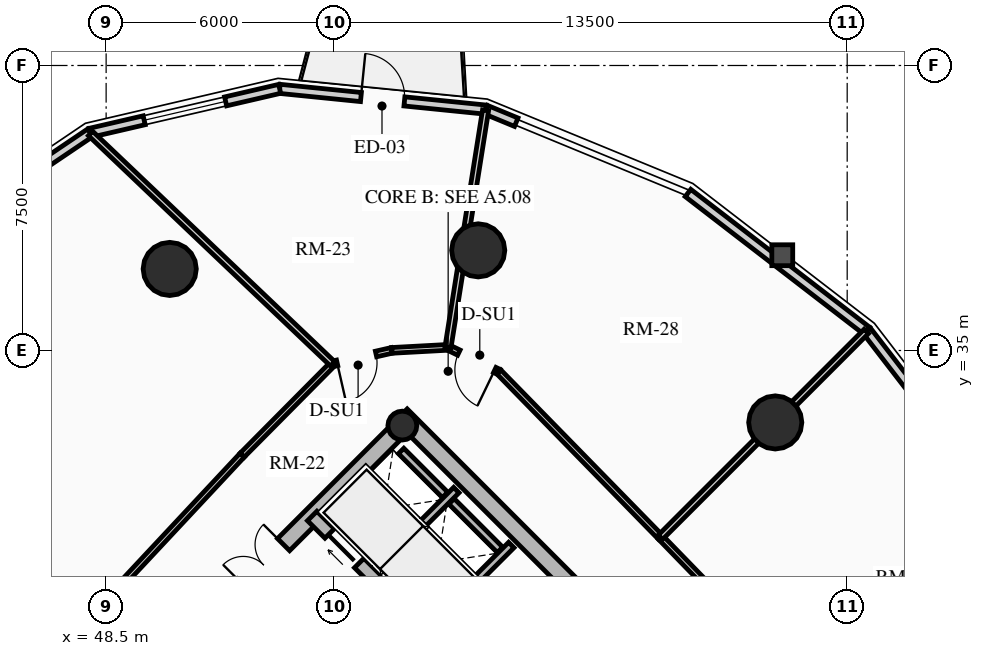
"""IFC4 building model, lengths in metres.
Left out: names, types, materials, properties, quantities, classifications, styles, units other than length and angle.
Written with IfcOpenShell. Run it as: python <this file> out.ifc"""

import sys

from ifc_helpers import new_model, si_unit, direction, frame, frame_2d, origin, origin_2d, place, context, subcontext, project, spatial, rectangle, circle, hollow_circle, extrude, source, transform, mapped, element, fill, save


model = new_model("IFC4")
c1 = context("Model", 3, precision=1e-05, world=origin(), true_north=direction((0.0, 1.0)))
c2 = subcontext(c1, "Body", "Model", "MODEL_VIEW")
j1 = project(units=[si_unit("LENGTHUNIT", "METRE"), si_unit("PLANEANGLEUNIT", "RADIAN")], contexts=[c1])
p1 = place(None, origin())
s1 = spatial("IfcSite", under=j1, at=p1, CompositionType="ELEMENT")
p2 = place(p1, origin())
s2 = spatial("IfcBuilding", under=s1, at=p2, CompositionType="ELEMENT")
p3 = place(p2, frame((0.0, 0.0, 122.53)))
s3 = spatial("IfcBuildingStorey", under=s2, at=p3, CompositionType="ELEMENT", Elevation=122.53)
p4 = place(p3, frame((66.303, 23.263, 0.0), z_axis=(0.0, 0.0, 1.0), x_axis=(-0.707106781187, 0.707106781187, 0.0)))
e1 = element("IfcWall", 1, at=p4, inside=s3, PredefinedType="SHEAR", context=c2, shape_type="SweptSolid", body=[
    extrude(rectangle(XDim=14.2, YDim=0.45, at=frame_2d((7.1, 0.0))), origin(), (0.0, 0.0, 1.0), 2.91),
])
p5 = place(p3, frame((48.856, 25.578, 0.0), z_axis=(0.0, 0.0, 1.0), x_axis=(0.707106781187, 0.707106781187, 0.0)))
e2 = element("IfcWall", 2, at=p5, inside=s3, PredefinedType="SHEAR", context=c2, shape_type="SweptSolid", body=[
    extrude(rectangle(XDim=10.7, YDim=0.45, at=frame_2d((5.35, 0.0))), origin(), (0.0, 0.0, 1.0), 2.91),
])
m1 = source(origin(), c2, "Body", "SweptSolid", [
    extrude(rectangle(XDim=1.5, YDim=2.02, at=frame_2d((0.75, 1.01))), frame((0.0, 0.235, 0.0), z_axis=(0.0, -1.0, 0.0), x_axis=(1.0, 0.0, 0.0)), (0.0, 0.0, 1.0), 0.47),
])
p6 = place(p5, frame((4.6, 0.0, 0.0)))
e3 = element("IfcOpeningElement", 3, at=p6, cuts=e2, PredefinedType="OPENING", context=c2, shape_type="MappedRepresentation", body=[
    mapped(m1, transform((0.0, 0.0, 0.0), x_axis=(1.0, 0.0, 0.0), y_axis=(0.0, 1.0, 0.0), z_axis=(0.0, 0.0, 1.0), scale=1.0)),
])
p7 = place(p3, frame((63.645, 20.922, 0.0), z_axis=(0.0, 0.0, 1.0), x_axis=(-0.707106781187, 0.707106781187, 0.0)))
e4 = element("IfcWall", 4, at=p7, inside=s3, PredefinedType="SHEAR", context=c2, shape_type="SweptSolid", body=[
    extrude(rectangle(XDim=13.75, YDim=0.35, at=frame_2d((6.875, 0.0))), origin(), (0.0, 0.0, 1.0), 2.91),
])
m2 = source(origin(), c2, "Body", "SweptSolid", [
    extrude(rectangle(XDim=1.1, YDim=2.015, at=frame_2d((0.55, 1.007))), frame((0.0, 0.185, 0.0), z_axis=(0.0, -1.0, 0.0), x_axis=(1.0, 0.0, 0.0)), (0.0, 0.0, 1.0), 0.37),
])
p8 = place(p7, frame((10.0, 0.0, 0.0)))
e5 = element("IfcOpeningElement", 5, at=p8, cuts=e4, PredefinedType="OPENING", context=c2, shape_type="MappedRepresentation", body=[
    mapped(m2, transform((0.0, 0.0, 0.0), x_axis=(1.0, 0.0, 0.0), y_axis=(0.0, 1.0, 0.0), z_axis=(0.0, 0.0, 1.0), scale=1.0)),
])
p9 = place(p7, frame((12.0, 0.0, 0.0)))
e6 = element("IfcOpeningElement", 6, at=p9, cuts=e4, PredefinedType="OPENING", context=c2, shape_type="MappedRepresentation", body=[
    mapped(m2, transform((0.0, 0.0, 0.0), x_axis=(1.0, 0.0, 0.0), y_axis=(0.0, 1.0, 0.0), z_axis=(0.0, 0.0, 1.0), scale=1.0)),
])
m3 = source(origin(), c2, "Body", "SweptSolid", [
    extrude(rectangle(XDim=1.15, YDim=2.02, at=frame_2d((0.575, 1.01))), frame((0.0, 0.185, 0.0), z_axis=(0.0, -1.0, 0.0), x_axis=(1.0, 0.0, 0.0)), (0.0, 0.0, 1.0), 0.37),
])
p10 = place(p7, frame((5.305, 0.0, 0.0)))
e7 = element("IfcOpeningElement", 7, at=p10, cuts=e4, PredefinedType="OPENING", context=c2, shape_type="MappedRepresentation", body=[
    mapped(m3, transform((0.0, 0.0, 0.0), x_axis=(1.0, 0.0, 0.0), y_axis=(0.0, 1.0, 0.0), z_axis=(0.0, 0.0, 1.0), scale=1.0)),
])
p11 = place(p3, frame((56.294, 33.024, 0.0), z_axis=(0.0, 0.0, 1.0), x_axis=(0.707106781187, 0.707106781187, 0.0)))
e8 = element("IfcColumn", 8, at=p11, inside=s3, PredefinedType="COLUMN", context=c2, shape_type="SweptSolid", body=[
    extrude(hollow_circle(Radius=0.38, WallThickness=0.032, at=origin_2d()), origin(), (0.0, 0.0, 1.0), 2.91),
])
for number, where, z_axis, x_axis in (
    (9, (66.107, 33.107, 0.0), (0.0, 0.0, 1.0), (1.0, 0.0, 0.0)),
    (10, (58.291, 37.635, 0.0), (0.0, 0.0, 1.0), (1.0, 0.0, 0.0)),
    (11, (50.173, 37.146, 0.0), (0.0, 0.0, 1.0), (1.0, 0.0, 0.0)),
):
    element("IfcColumn", number, at=place(p3, frame(where, z_axis=z_axis, x_axis=x_axis)), inside=s3, PredefinedType="USERDEFINED", context=c2, shape_type="SweptSolid", body=[
        extrude(circle(Radius=0.7, at=origin_2d()), origin(), (0.0, 0.0, 1.0), 2.91),
    ])
p12 = place(p3, frame((63.811, 39.145, 0.0), z_axis=(0.0, 0.0, 1.0), x_axis=(0.791982052206, -0.61054437102, 0.0)))
e12 = element("IfcWall", 12, at=p12, inside=s3, PredefinedType="SOLIDWALL", context=c2, shape_type="SweptSolid", body=[
    extrude(rectangle(XDim=5.942, YDim=0.24, at=frame_2d((2.971, 0.0))), origin(), (0.0, 0.0, 1.0), 2.139),
])
p13 = place(p3, frame((58.487, 41.339, 0.0), z_axis=(0.0, 0.0, 1.0), x_axis=(0.924556017656, -0.381046152345, 0.0)))
e13 = element("IfcWall", 13, at=p13, inside=s3, PredefinedType="SOLIDWALL", context=c2, shape_type="SweptSolid", body=[
    extrude(rectangle(XDim=0.87, YDim=0.24, at=frame_2d((0.435, 0.0))), origin(), (0.0, 0.0, 1.0), 2.139),
])
p14 = place(p3, frame((53.067, 41.885, 0.0), z_axis=(0.0, 0.0, 1.0), x_axis=(0.994971754311, -0.10015591906, 0.0)))
e14 = element("IfcWall", 14, at=p14, inside=s3, PredefinedType="SOLIDWALL", context=c2, shape_type="SweptSolid", body=[
    extrude(rectangle(XDim=5.448, YDim=0.24, at=frame_2d((2.724, 0.0))), origin(), (0.0, 0.0, 1.0), 2.139),
])
m4 = source(origin(), c2, "Body", "SweptSolid", [
    extrude(rectangle(XDim=1.15, YDim=2.005, at=frame_2d((0.575, 1.002))), frame((0.0, 0.13, 0.0), z_axis=(0.0, -1.0, 0.0), x_axis=(1.0, 0.0, 0.0)), (0.0, 0.0, 1.0), 0.26),
])
p15 = place(p14, frame((2.149, 0.0, 0.0)))
e15 = element("IfcOpeningElement", 15, at=p15, cuts=e14, PredefinedType="OPENING", context=c2, shape_type="MappedRepresentation", body=[
    mapped(m4, transform((0.0, 0.0, 0.0), x_axis=(1.0, 0.0, 0.0), y_axis=(0.0, 1.0, 0.0), z_axis=(0.0, 0.0, 1.0), scale=1.0)),
])
p16 = place(p3, frame((48.08, 40.729, 0.0), z_axis=(0.0, 0.0, 1.0), x_axis=(0.974165631126, 0.225834725257, 0.0)))
e16 = element("IfcWall", 16, at=p16, inside=s3, PredefinedType="SOLIDWALL", context=c2, shape_type="SweptSolid", body=[
    extrude(rectangle(XDim=5.119, YDim=0.24, at=frame_2d((2.56, 0.0))), origin(), (0.0, 0.0, 1.0), 2.139),
])
m5 = source(origin(), c2, "Body", "SweptSolid", [
    extrude(rectangle(XDim=2.2, YDim=1.35, at=frame_2d((1.1, 0.675))), frame((0.0, 0.13, 0.0), z_axis=(0.0, -1.0, 0.0), x_axis=(1.0, 0.0, 0.0)), (0.0, 0.0, 1.0), 0.26),
])
p17 = place(p16, frame((1.459, 0.0, 0.65)))
e17 = element("IfcOpeningElement", 17, at=p17, cuts=e16, PredefinedType="OPENING", context=c2, shape_type="MappedRepresentation", body=[
    mapped(m5, transform((0.0, 0.0, 0.0), x_axis=(1.0, 0.0, 0.0), y_axis=(0.0, 1.0, 0.0), z_axis=(0.0, 0.0, 1.0), scale=1.0)),
])
p18 = place(p3, frame((44.015, 37.985, 0.0), z_axis=(0.0, 0.0, 1.0), x_axis=(0.828781148131, 0.559572880421, 0.0)))
e18 = element("IfcWall", 18, at=p18, inside=s3, PredefinedType="SOLIDWALL", context=c2, shape_type="SweptSolid", body=[
    extrude(rectangle(XDim=4.905, YDim=0.24, at=frame_2d((2.452, 0.0))), origin(), (0.0, 0.0, 1.0), 2.139),
])
p19 = place(p3, frame((68.517, 35.517, 0.0), z_axis=(0.0, 0.0, 1.0), x_axis=(0.61054437102, -0.791982052206, 0.0)))
e19 = element("IfcWall", 19, at=p19, inside=s3, PredefinedType="SOLIDWALL", context=c2, shape_type="SweptSolid", body=[
    extrude(rectangle(XDim=5.942, YDim=0.24, at=frame_2d((2.971, 0.0))), origin(), (0.0, 0.0, 1.0), 2.139),
])
m6 = source(origin(), c2, "Body", "SweptSolid", [
    extrude(rectangle(XDim=1.9, YDim=1.35, at=frame_2d((0.95, 0.675))), frame((0.0, 0.13, 0.0), z_axis=(0.0, -1.0, 0.0), x_axis=(1.0, 0.0, 0.0)), (0.0, 0.0, 1.0), 0.26),
])
p20 = place(p19, frame((2.021, 0.0, 0.65)))
e20 = element("IfcOpeningElement", 20, at=p20, cuts=e19, PredefinedType="OPENING", context=c2, shape_type="MappedRepresentation", body=[
    mapped(m6, transform((0.0, 0.0, 0.0), x_axis=(1.0, 0.0, 0.0), y_axis=(0.0, 1.0, 0.0), z_axis=(0.0, 0.0, 1.0), scale=1.0)),
])
p21 = place(p3, frame((57.062, 27.781, 0.0), z_axis=(0.0, 0.0, 1.0), x_axis=(0.707106781187, 0.707106781187, 0.0)))
e21 = element("IfcWall", 21, at=p21, inside=s3, PredefinedType="SHEAR", context=c2, shape_type="SweptSolid", body=[
    extrude(rectangle(XDim=2.97, YDim=0.2, at=frame_2d((1.485, 0.0))), origin(), (0.0, 0.0, 1.0), 2.91),
])
p22 = place(p3, frame((55.615, 29.227, 0.0), z_axis=(0.0, 0.0, 1.0), x_axis=(0.707147878904, 0.70706568108, 0.0)))
e22 = element("IfcWall", 22, at=p22, inside=s3, PredefinedType="SHEAR", context=c2, shape_type="SweptSolid", body=[
    extrude(rectangle(XDim=2.97, YDim=0.2, at=frame_2d((1.485, 0.0))), origin(), (0.0, 0.0, 1.0), 2.91),
])
p23 = place(p3, frame((58.865, 29.754, 0.0), z_axis=(0.0, 0.0, 1.0), x_axis=(-0.707174411312, 0.707039144592, 0.0)))
e23 = element("IfcWall", 23, at=p23, inside=s3, PredefinedType="SHEAR", context=c2, shape_type="SweptSolid", body=[
    extrude(rectangle(XDim=1.805, YDim=0.2, at=frame_2d((0.902, 0.0))), origin(), (0.0, 0.0, 1.0), 2.91),
])
p24 = place(p3, frame((57.419, 31.2, 0.0), z_axis=(0.0, 0.0, 1.0), x_axis=(-0.707032117043, 0.707181437447, 0.0)))
e24 = element("IfcWall", 24, at=p24, inside=s3, PredefinedType="SHEAR", context=c2, shape_type="SweptSolid", body=[
    extrude(rectangle(XDim=1.635, YDim=0.2, at=frame_2d((0.817, 0.0))), origin(), (0.0, 0.0, 1.0), 2.91),
])
p25 = place(p3, frame((63.086, 30.086, 0.0), z_axis=(0.0, 0.0, 1.0), x_axis=(-0.699032802832, 0.715089603172, 0.0)))
e25 = element("IfcWall", 25, at=p25, inside=s3, PredefinedType="PARTITIONING", context=c2, shape_type="SweptSolid", body=[
    extrude(rectangle(XDim=6.082, YDim=0.15, at=frame_2d((3.041, 0.0))), origin(), (0.0, 0.0, 1.0), 2.185),
])
p26 = place(p3, frame((58.835, 34.435, 0.0), z_axis=(0.0, 0.0, 1.0), x_axis=(-0.900352167336, 0.4351620098, 0.0)))
e26 = element("IfcWall", 26, at=p26, inside=s3, PredefinedType="PARTITIONING", context=c2, shape_type="SweptSolid", body=[
    extrude(rectangle(XDim=1.488, YDim=0.15, at=frame_2d((0.744, 0.0))), origin(), (0.0, 0.0, 1.0), 2.185),
])
m7 = source(origin(), c2, "Body", "SweptSolid", [
    extrude(rectangle(XDim=1.05, YDim=2.015, at=frame_2d((0.525, 1.007))), frame((0.0, 0.085, 0.0), z_axis=(0.0, -1.0, 0.0), x_axis=(1.0, 0.0, 0.0)), (0.0, 0.0, 1.0), 0.17),
])
p27 = place(p26, frame((0.12, 0.0, 0.0)))
e27 = element("IfcOpeningElement", 27, at=p27, cuts=e26, PredefinedType="OPENING", context=c2, shape_type="MappedRepresentation", body=[
    mapped(m7, transform((0.0, 0.0, 0.0), x_axis=(1.0, 0.0, 0.0), y_axis=(0.0, 1.0, 0.0), z_axis=(0.0, 0.0, 1.0), scale=1.0)),
])
p28 = place(p3, frame((57.495, 35.083, 0.0), z_axis=(0.0, 0.0, 1.0), x_axis=(-0.998536503254, -0.054081897798, 0.0)))
e28 = element("IfcWall", 28, at=p28, inside=s3, PredefinedType="PARTITIONING", context=c2, shape_type="SweptSolid", body=[
    extrude(rectangle(XDim=1.481, YDim=0.15, at=frame_2d((0.74, 0.0))), origin(), (0.0, 0.0, 1.0), 2.185),
])
p29 = place(p3, frame((56.017, 35.003, 0.0), z_axis=(0.0, 0.0, 1.0), x_axis=(-0.974924954781, -0.222533890777, 0.0)))
e29 = element("IfcWall", 29, at=p29, inside=s3, PredefinedType="PARTITIONING", context=c2, shape_type="SweptSolid", body=[
    extrude(rectangle(XDim=1.595, YDim=0.15, at=frame_2d((0.798, 0.0))), origin(), (0.0, 0.0, 1.0), 2.185),
])
p30 = place(p29, frame((0.425, 0.0, 0.0)))
e30 = element("IfcOpeningElement", 30, at=p30, cuts=e29, PredefinedType="OPENING", context=c2, shape_type="MappedRepresentation", body=[
    mapped(m7, transform((0.0, 0.0, 0.0), x_axis=(1.0, 0.0, 0.0), y_axis=(0.0, 1.0, 0.0), z_axis=(0.0, 0.0, 1.0), scale=1.0)),
])
p31 = place(p3, frame((54.461, 34.648, 0.0), z_axis=(0.0, 0.0, 1.0), x_axis=(-0.70403409755, -0.710166170334, 0.0)))
e31 = element("IfcWall", 31, at=p31, inside=s3, PredefinedType="PARTITIONING", context=c2, shape_type="SweptSolid", body=[
    extrude(rectangle(XDim=3.384, YDim=0.15, at=frame_2d((1.692, 0.0))), origin(), (0.0, 0.0, 1.0), 2.185),
])
p32 = place(p3, frame((52.079, 32.244, 0.0), z_axis=(0.0, 0.0, 1.0), x_axis=(-0.682703325574, -0.730695674854, 0.0)))
e32 = element("IfcWall", 32, at=p32, inside=s3, PredefinedType="PARTITIONING", context=c2, shape_type="SweptSolid", body=[
    extrude(rectangle(XDim=6.527, YDim=0.15, at=frame_2d((3.263, 0.0))), origin(), (0.0, 0.0, 1.0), 2.185),
])
p33 = place(p3, frame((67.247, 25.802, 0.0), z_axis=(0.0, 0.0, 1.0), x_axis=(-0.696771261687, 0.71729339108, 0.0)))
e33 = element("IfcWall", 33, at=p33, inside=s3, PredefinedType="PARTITIONING", context=c2, shape_type="SweptSolid", body=[
    extrude(rectangle(XDim=5.972, YDim=0.15, at=frame_2d((2.986, 0.0))), origin(), (0.0, 0.0, 1.0), 2.615),
])
m8 = source(origin(), c2, "Body", "SweptSolid", [
    extrude(rectangle(XDim=1.0, YDim=2.015, at=frame_2d((0.5, 1.007))), frame((0.0, 0.085, 0.0), z_axis=(0.0, -1.0, 0.0), x_axis=(1.0, 0.0, 0.0)), (0.0, 0.0, 1.0), 0.17),
])
p34 = place(p33, frame((2.486, 0.0, 0.0)))
e34 = element("IfcOpeningElement", 34, at=p34, cuts=e33, PredefinedType="OPENING", context=c2, shape_type="MappedRepresentation", body=[
    mapped(m8, transform((0.0, 0.0, 0.0), x_axis=(1.0, 0.0, 0.0), y_axis=(0.0, 1.0, 0.0), z_axis=(0.0, 0.0, 1.0), scale=1.0)),
])
p35 = place(p3, frame((63.086, 30.086, 0.0), z_axis=(0.0, 0.0, 1.0), x_axis=(0.707106781187, 0.707106781187, 0.0)))
e35 = element("IfcWall", 35, at=p35, inside=s3, PredefinedType="PARTITIONING", context=c2, shape_type="SweptSolid", body=[
    extrude(rectangle(XDim=7.661, YDim=0.16, at=frame_2d((3.831, 0.0))), origin(), (0.0, 0.0, 1.0), 2.139),
])
p36 = place(p3, frame((57.495, 35.083, 0.0), z_axis=(0.0, 0.0, 1.0), x_axis=(0.156619688156, 0.987658986332, 0.0)))
e36 = element("IfcWall", 36, at=p36, inside=s3, PredefinedType="PARTITIONING", context=c2, shape_type="SweptSolid", body=[
    extrude(rectangle(XDim=6.315, YDim=0.16, at=frame_2d((3.157, 0.0))), origin(), (0.0, 0.0, 1.0), 2.139),
])
p37 = place(p3, frame((54.461, 34.648, 0.0), z_axis=(0.0, 0.0, 1.0), x_axis=(-0.724444126295, 0.689333524411, 0.0)))
e37 = element("IfcWall", 37, at=p37, inside=s3, PredefinedType="PARTITIONING", context=c2, shape_type="SweptSolid", body=[
    extrude(rectangle(XDim=8.796, YDim=0.16, at=frame_2d((4.398, 0.0))), origin(), (0.0, 0.0, 1.0), 2.139),
])
m9 = source(origin(), c2, "Body", "SweptSolid", [
    extrude(rectangle(XDim=1.15, YDim=2.005, at=frame_2d((0.575, 1.002))), frame((0.0, 0.025, 0.0), z_axis=(0.0, -1.0, 0.0), x_axis=(1.0, 0.0, 0.0)), (0.0, 0.0, 1.0), 0.05),
])
p38 = place(p15, origin())
e38 = element("IfcDoor", 38, at=p38, inside=s3, OperationType="SINGLE_SWING_LEFT", PredefinedType="DOOR", context=c2, shape_type="MappedRepresentation", body=[
    mapped(m9, transform((0.0, 0.0, 0.0), x_axis=(1.0, 0.0, 0.0), y_axis=(0.0, 1.0, 0.0), z_axis=(0.0, 0.0, 1.0), scale=1.0)),
])
fill(e15, e38)
m10 = source(origin(), c2, "Body", "SweptSolid", [
    extrude(rectangle(XDim=2.2, YDim=1.35, at=frame_2d((1.1, 0.675))), frame((0.0, 0.03, 0.0), z_axis=(0.0, -1.0, 0.0), x_axis=(1.0, 0.0, 0.0)), (0.0, 0.0, 1.0), 0.06),
])
p39 = place(p17, origin())
e39 = element("IfcWindow", 39, at=p39, inside=s3, PartitioningType="DOUBLE_PANEL_VERTICAL", PredefinedType="WINDOW", context=c2, shape_type="MappedRepresentation", body=[
    mapped(m10, transform((0.0, 0.0, 0.0), x_axis=(1.0, 0.0, 0.0), y_axis=(0.0, 1.0, 0.0), z_axis=(0.0, 0.0, 1.0), scale=1.0)),
])
fill(e17, e39)
m11 = source(origin(), c2, "Body", "SweptSolid", [
    extrude(rectangle(XDim=1.1, YDim=2.015, at=frame_2d((0.55, 1.007))), frame((0.0, 0.025, 0.0), z_axis=(0.0, -1.0, 0.0), x_axis=(1.0, 0.0, 0.0)), (0.0, 0.0, 1.0), 0.05),
])
p40 = place(p9, origin())
e40 = element("IfcDoor", 40, at=p40, inside=s3, OperationType="SLIDING_TO_RIGHT", PredefinedType="DOOR", context=c2, shape_type="MappedRepresentation", body=[
    mapped(m11, transform((0.0, 0.0, 0.0), x_axis=(1.0, 0.0, 0.0), y_axis=(0.0, 1.0, 0.0), z_axis=(0.0, 0.0, 1.0), scale=1.0)),
])
fill(e6, e40)
m12 = source(origin(), c2, "Body", "SweptSolid", [
    extrude(rectangle(XDim=1.5, YDim=2.02, at=frame_2d((0.75, 1.01))), frame((0.0, 0.025, 0.0), z_axis=(0.0, -1.0, 0.0), x_axis=(1.0, 0.0, 0.0)), (0.0, 0.0, 1.0), 0.05),
])
p41 = place(p6, origin())
e41 = element("IfcDoor", 41, at=p41, inside=s3, OperationType="DOUBLE_DOOR_SINGLE_SWING", PredefinedType="DOOR", context=c2, shape_type="MappedRepresentation", body=[
    mapped(m12, transform((0.0, 0.0, 0.0), x_axis=(1.0, 0.0, 0.0), y_axis=(0.0, 1.0, 0.0), z_axis=(0.0, 0.0, 1.0), scale=1.0)),
])
fill(e3, e41)
m13 = source(origin(), c2, "Body", "SweptSolid", [
    extrude(rectangle(XDim=1.05, YDim=2.015, at=frame_2d((0.525, 1.007))), frame((0.0, 0.025, 0.0), z_axis=(0.0, -1.0, 0.0), x_axis=(1.0, 0.0, 0.0)), (0.0, 0.0, 1.0), 0.05),
])
p42 = place(p30, origin())
e42 = element("IfcDoor", 42, at=p42, inside=s3, OperationType="SINGLE_SWING_RIGHT", PredefinedType="DOOR", context=c2, shape_type="MappedRepresentation", body=[
    mapped(m13, transform((0.0, 0.0, 0.0), x_axis=(1.0, 0.0, 0.0), y_axis=(0.0, 1.0, 0.0), z_axis=(0.0, 0.0, 1.0), scale=1.0)),
])
fill(e30, e42)
p43 = place(p27, origin())
e43 = element("IfcDoor", 43, at=p43, inside=s3, OperationType="SINGLE_SWING_LEFT", PredefinedType="DOOR", context=c2, shape_type="MappedRepresentation", body=[
    mapped(m13, transform((0.0, 0.0, 0.0), x_axis=(1.0, 0.0, 0.0), y_axis=(0.0, 1.0, 0.0), z_axis=(0.0, 0.0, 1.0), scale=1.0)),
])
fill(e27, e43)
save(model, sys.argv[1])
